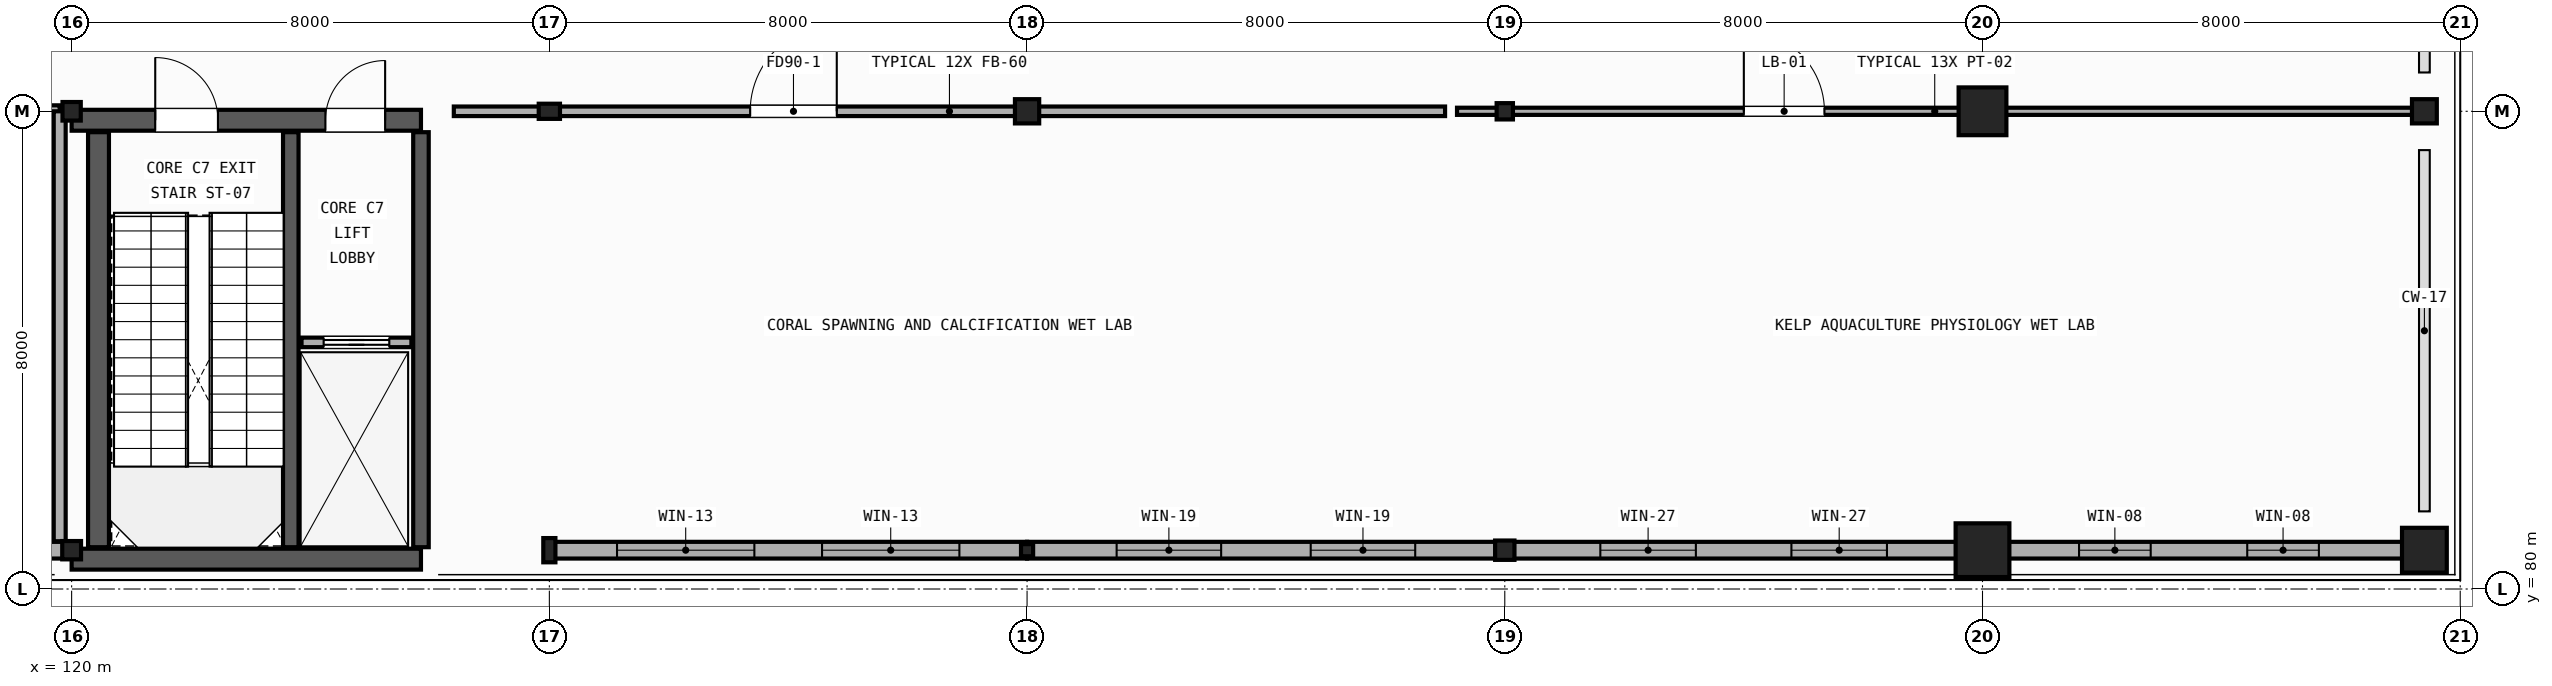
"""IFC4 building model, lengths in metres.
Left out: names, types, materials, properties, quantities, classifications, styles, units other than length and angle.
Written with IfcOpenShell. Run it as: python <this file> out.ifc"""

import sys

from ifc_helpers import new_model, si_unit, direction, frame, frame_2d, origin, origin_2d, place, context, subcontext, project, spatial, rectangle, hollow_rectangle, circle, hollow_circle, i_section, extrude, element, fill, save


model = new_model("IFC4")
c1 = context("Model", 3, precision=1e-05, world=origin(), true_north=direction((0.0, 1.0)))
c2 = subcontext(c1, "Body", "Model", "MODEL_VIEW")
j1 = project(units=[si_unit("LENGTHUNIT", "METRE"), si_unit("PLANEANGLEUNIT", "RADIAN")], contexts=[c1])
p1 = place(None, origin())
s1 = spatial("IfcSite", under=j1, at=p1, CompositionType="ELEMENT")
p2 = place(p1, origin())
s2 = spatial("IfcBuilding", under=s1, at=p2, CompositionType="ELEMENT")
p3 = place(p2, frame((0.0, 0.0, 5.4)))
s3 = spatial("IfcBuildingStorey", under=s2, at=p3, CompositionType="ELEMENT", Elevation=5.4)
p4 = place(p3, frame((120.0, 80.65, 0.0), z_axis=(0.0, 0.0, 1.0), x_axis=(0.0, 1.0, 0.0)))
e1 = element("IfcColumn", 1, at=p4, inside=s3, PredefinedType="COLUMN", context=c2, shape_type="SweptSolid", body=[
    extrude(i_section(OverallWidth=0.307, OverallDepth=0.315, WebThickness=0.012, FlangeThickness=0.019, FilletRadius=0.013, at=origin_2d()), origin(), (0.0, 0.0, 1.0), 4.52),
])
p5 = place(p3, frame((120.0, 88.0, 0.0), z_axis=(0.0, 0.0, 1.0), x_axis=(1.0, 0.0, 0.0)))
e2 = element("IfcColumn", 2, at=p5, inside=s3, PredefinedType="COLUMN", context=c2, shape_type="SweptSolid", body=[
    extrude(i_section(OverallWidth=0.306, OverallDepth=0.311, WebThickness=0.011, FlangeThickness=0.017, FilletRadius=0.013, at=origin_2d()), origin(), (0.0, 0.0, 1.0), 4.52),
])
p6 = place(p3, frame((128.0, 80.65, 0.0), z_axis=(0.0, 0.0, 1.0), x_axis=(1.0, 0.0, 0.0)))
e3 = element("IfcColumn", 3, at=p6, inside=s3, PredefinedType="COLUMN", context=c2, shape_type="SweptSolid", body=[
    extrude(hollow_rectangle(XDim=0.203, YDim=0.406, WallThickness=0.012, InnerFilletRadius=0.012, OuterFilletRadius=0.024, at=origin_2d()), origin(), (0.0, 0.0, 1.0), 4.52),
])
p7 = place(p3, frame((128.0, 88.0, 0.0), z_axis=(0.0, 0.0, 1.0), x_axis=(0.0, 1.0, 0.0)))
e4 = element("IfcColumn", 4, at=p7, inside=s3, PredefinedType="COLUMN", context=c2, shape_type="SweptSolid", body=[
    extrude(hollow_rectangle(XDim=0.254, YDim=0.356, WallThickness=0.012, InnerFilletRadius=0.012, OuterFilletRadius=0.024, at=origin_2d()), origin(), (0.0, 0.0, 1.0), 4.52),
])
p8 = place(p3, frame((136.0, 80.65, 0.0), z_axis=(0.0, 0.0, 1.0), x_axis=(0.0, 1.0, 0.0)))
e5 = element("IfcColumn", 5, at=p8, inside=s3, PredefinedType="COLUMN", context=c2, shape_type="SweptSolid", body=[
    extrude(hollow_rectangle(XDim=0.203, YDim=0.203, WallThickness=0.009, InnerFilletRadius=0.009, OuterFilletRadius=0.018, at=origin_2d()), origin(), (0.0, 0.0, 1.0), 4.52),
])
p9 = place(p3, frame((136.0, 88.0, 0.0), z_axis=(0.0, 0.0, 1.0), x_axis=(1.0, 0.0, 0.0)))
e6 = element("IfcColumn", 6, at=p9, inside=s3, PredefinedType="COLUMN", context=c2, shape_type="SweptSolid", body=[
    extrude(hollow_circle(Radius=0.203, WallThickness=0.012, at=origin_2d()), origin(), (0.0, 0.0, 1.0), 4.52),
])
p10 = place(p3, frame((144.0, 80.65, 0.0), z_axis=(0.0, 0.0, 1.0), x_axis=(1.0, 0.0, 0.0)))
e7 = element("IfcColumn", 7, at=p10, inside=s3, PredefinedType="COLUMN", context=c2, shape_type="SweptSolid", body=[
    extrude(hollow_circle(Radius=0.162, WallThickness=0.012, at=origin_2d()), origin(), (0.0, 0.0, 1.0), 4.52),
])
p11 = place(p3, frame((144.0, 88.0, 0.0), z_axis=(0.0, 0.0, 1.0), x_axis=(0.0, 1.0, 0.0)))
e8 = element("IfcColumn", 8, at=p11, inside=s3, PredefinedType="COLUMN", context=c2, shape_type="SweptSolid", body=[
    extrude(hollow_circle(Radius=0.136, WallThickness=0.012, at=origin_2d()), origin(), (0.0, 0.0, 1.0), 4.52),
])
p12 = place(p3, frame((152.0, 80.65, 0.0), z_axis=(0.0, 0.0, 1.0), x_axis=(0.0, 1.0, 0.0)))
e9 = element("IfcColumn", 9, at=p12, inside=s3, PredefinedType="COLUMN", context=c2, shape_type="SweptSolid", body=[
    extrude(rectangle(XDim=0.9, YDim=0.9, at=origin_2d()), origin(), (0.0, 0.0, 1.0), 4.52),
])
p13 = place(p3, frame((152.0, 88.0, 0.0), z_axis=(0.0, 0.0, 1.0), x_axis=(1.0, 0.0, 0.0)))
e10 = element("IfcColumn", 10, at=p13, inside=s3, PredefinedType="COLUMN", context=c2, shape_type="SweptSolid", body=[
    extrude(rectangle(XDim=0.8, YDim=0.8, at=origin_2d()), origin(), (0.0, 0.0, 1.0), 4.52),
])
p14 = place(p3, frame((159.4, 80.65, 0.0), z_axis=(0.0, 0.0, 1.0), x_axis=(1.0, 0.0, 0.0)))
e11 = element("IfcColumn", 11, at=p14, inside=s3, PredefinedType="COLUMN", context=c2, shape_type="SweptSolid", body=[
    extrude(circle(Radius=0.375, at=origin_2d()), origin(), (0.0, 0.0, 1.0), 4.52),
])
p15 = place(p3, frame((159.4, 88.0, 0.0), z_axis=(0.0, 0.0, 1.0), x_axis=(0.0, 1.0, 0.0)))
e12 = element("IfcColumn", 12, at=p15, inside=s3, PredefinedType="COLUMN", context=c2, shape_type="SweptSolid", body=[
    extrude(i_section(OverallWidth=0.406, OverallDepth=0.416, WebThickness=0.03, FlangeThickness=0.048, FilletRadius=0.015, at=origin_2d()), origin(), (0.0, 0.0, 1.0), 4.52),
])
p16 = place(p3, frame((112.65, 80.65, 0.0), z_axis=(0.0, 0.0, 1.0), x_axis=(1.0, 0.0, 0.0)))
e13 = element("IfcWall", 13, at=p16, inside=s3, PredefinedType="STANDARD", context=c2, shape_type="SweptSolid", body=[
    extrude(rectangle(XDim=7.35, YDim=0.28, at=frame_2d((3.675, 0.0))), origin(), (0.0, 0.0, 1.0), 3.872),
])
p17 = place(p16, frame((1.383, 0.0, 0.95)))
e14 = element("IfcOpeningElement", 14, at=p17, cuts=e13, PredefinedType="OPENING", context=c2, shape_type="SweptSolid", body=[
    extrude(rectangle(XDim=1.6, YDim=2.3, at=frame_2d((0.8, 1.15))), frame((0.0, 0.15, 0.0), z_axis=(0.0, -1.0, 0.0), x_axis=(1.0, 0.0, 0.0)), (0.0, 0.0, 1.0), 0.3),
])
p18 = place(p16, frame((4.367, 0.0, 0.95)))
e15 = element("IfcOpeningElement", 15, at=p18, cuts=e13, PredefinedType="OPENING", context=c2, shape_type="SweptSolid", body=[
    extrude(rectangle(XDim=1.6, YDim=2.3, at=frame_2d((0.8, 1.15))), frame((0.0, 0.15, 0.0), z_axis=(0.0, -1.0, 0.0), x_axis=(1.0, 0.0, 0.0)), (0.0, 0.0, 1.0), 0.3),
])
p19 = place(p3, frame((128.0, 80.65, 0.0), z_axis=(0.0, 0.0, 1.0), x_axis=(1.0, 0.0, 0.0)))
e16 = element("IfcWall", 16, at=p19, inside=s3, PredefinedType="STANDARD", context=c2, shape_type="SweptSolid", body=[
    extrude(rectangle(XDim=8.0, YDim=0.28, at=frame_2d((4.0, 0.0))), origin(), (0.0, 0.0, 1.0), 3.68),
])
p20 = place(p19, frame((1.133, 0.0, 2.25)))
e17 = element("IfcOpeningElement", 17, at=p20, cuts=e16, PredefinedType="OPENING", context=c2, shape_type="SweptSolid", body=[
    extrude(rectangle(XDim=2.3, YDim=1.2, at=frame_2d((1.15, 0.6))), frame((0.0, 0.15, 0.0), z_axis=(0.0, -1.0, 0.0), x_axis=(1.0, 0.0, 0.0)), (0.0, 0.0, 1.0), 0.3),
])
p21 = place(p19, frame((4.567, 0.0, 2.25)))
e18 = element("IfcOpeningElement", 18, at=p21, cuts=e16, PredefinedType="OPENING", context=c2, shape_type="SweptSolid", body=[
    extrude(rectangle(XDim=2.3, YDim=1.2, at=frame_2d((1.15, 0.6))), frame((0.0, 0.15, 0.0), z_axis=(0.0, -1.0, 0.0), x_axis=(1.0, 0.0, 0.0)), (0.0, 0.0, 1.0), 0.3),
])
p22 = place(p3, frame((136.0, 80.65, 0.0), z_axis=(0.0, 0.0, 1.0), x_axis=(1.0, 0.0, 0.0)))
e19 = element("IfcWall", 19, at=p22, inside=s3, PredefinedType="STANDARD", context=c2, shape_type="SweptSolid", body=[
    extrude(rectangle(XDim=8.0, YDim=0.28, at=frame_2d((4.0, 0.0))), origin(), (0.0, 0.0, 1.0), 3.68),
])
p23 = place(p22, frame((1.5, 0.0, 0.9)))
e20 = element("IfcOpeningElement", 20, at=p23, cuts=e19, PredefinedType="OPENING", context=c2, shape_type="SweptSolid", body=[
    extrude(rectangle(XDim=1.75, YDim=2.4, at=frame_2d((0.875, 1.2))), frame((0.0, 0.15, 0.0), z_axis=(0.0, -1.0, 0.0), x_axis=(1.0, 0.0, 0.0)), (0.0, 0.0, 1.0), 0.3),
])
p24 = place(p22, frame((4.75, 0.0, 0.9)))
e21 = element("IfcOpeningElement", 21, at=p24, cuts=e19, PredefinedType="OPENING", context=c2, shape_type="SweptSolid", body=[
    extrude(rectangle(XDim=1.75, YDim=2.4, at=frame_2d((0.875, 1.2))), frame((0.0, 0.15, 0.0), z_axis=(0.0, -1.0, 0.0), x_axis=(1.0, 0.0, 0.0)), (0.0, 0.0, 1.0), 0.3),
])
p25 = place(p3, frame((144.0, 80.65, 0.0), z_axis=(0.0, 0.0, 1.0), x_axis=(1.0, 0.0, 0.0)))
e22 = element("IfcWall", 22, at=p25, inside=s3, PredefinedType="STANDARD", context=c2, shape_type="SweptSolid", body=[
    extrude(rectangle(XDim=8.0, YDim=0.28, at=frame_2d((4.0, 0.0))), origin(), (0.0, 0.0, 1.0), 3.68),
])
p26 = place(p25, frame((1.6, 0.0, 1.05)))
e23 = element("IfcOpeningElement", 23, at=p26, cuts=e22, PredefinedType="OPENING", context=c2, shape_type="SweptSolid", body=[
    extrude(rectangle(XDim=1.6, YDim=1.75, at=frame_2d((0.8, 0.875))), frame((0.0, 0.15, 0.0), z_axis=(0.0, -1.0, 0.0), x_axis=(1.0, 0.0, 0.0)), (0.0, 0.0, 1.0), 0.3),
])
p27 = place(p25, frame((4.8, 0.0, 1.05)))
e24 = element("IfcOpeningElement", 24, at=p27, cuts=e22, PredefinedType="OPENING", context=c2, shape_type="SweptSolid", body=[
    extrude(rectangle(XDim=1.6, YDim=1.75, at=frame_2d((0.8, 0.875))), frame((0.0, 0.15, 0.0), z_axis=(0.0, -1.0, 0.0), x_axis=(1.0, 0.0, 0.0)), (0.0, 0.0, 1.0), 0.3),
])
p28 = place(p3, frame((152.0, 80.65, 0.0), z_axis=(0.0, 0.0, 1.0), x_axis=(1.0, 0.0, 0.0)))
e25 = element("IfcWall", 25, at=p28, inside=s3, PredefinedType="STANDARD", context=c2, shape_type="SweptSolid", body=[
    extrude(rectangle(XDim=7.25, YDim=0.28, at=frame_2d((3.625, 0.0))), origin(), (0.0, 0.0, 1.0), 3.727),
])
p29 = place(p28, frame((1.617, 0.0, 1.0)))
e26 = element("IfcOpeningElement", 26, at=p29, cuts=e25, PredefinedType="OPENING", context=c2, shape_type="SweptSolid", body=[
    extrude(rectangle(XDim=1.2, YDim=1.9, at=frame_2d((0.6, 0.95))), frame((0.0, 0.15, 0.0), z_axis=(0.0, -1.0, 0.0), x_axis=(1.0, 0.0, 0.0)), (0.0, 0.0, 1.0), 0.3),
])
p30 = place(p28, frame((4.433, 0.0, 1.0)))
e27 = element("IfcOpeningElement", 27, at=p30, cuts=e25, PredefinedType="OPENING", context=c2, shape_type="SweptSolid", body=[
    extrude(rectangle(XDim=1.2, YDim=1.9, at=frame_2d((0.6, 0.95))), frame((0.0, 0.15, 0.0), z_axis=(0.0, -1.0, 0.0), x_axis=(1.0, 0.0, 0.0)), (0.0, 0.0, 1.0), 0.3),
])
p31 = place(p3, frame((120.0, 87.85, 0.0), z_axis=(0.0, 0.0, 1.0), x_axis=(1.0, 0.0, 0.0)))
e28 = element("IfcWall", 28, at=p31, inside=s3, PredefinedType="SHEAR", context=c2, shape_type="SweptSolid", body=[
    extrude(rectangle(XDim=5.85, YDim=0.35, at=frame_2d((2.925, 0.0))), origin(), (0.0, 0.0, 1.0), 4.51),
])
p32 = place(p31, frame((1.4, 0.0, 0.0)))
e29 = element("IfcOpeningElement", 29, at=p32, cuts=e28, PredefinedType="OPENING", context=c2, shape_type="SweptSolid", body=[
    extrude(rectangle(XDim=1.05, YDim=2.1, at=frame_2d((0.525, 1.05))), frame((0.0, 0.185, 0.0), z_axis=(0.0, -1.0, 0.0), x_axis=(1.0, 0.0, 0.0)), (0.0, 0.0, 1.0), 0.37),
])
p33 = place(p31, frame((4.25, 0.0, 0.0)))
e30 = element("IfcOpeningElement", 30, at=p33, cuts=e28, PredefinedType="OPENING", context=c2, shape_type="SweptSolid", body=[
    extrude(rectangle(XDim=1.0, YDim=2.15, at=frame_2d((0.5, 1.075))), frame((0.0, 0.185, 0.0), z_axis=(0.0, -1.0, 0.0), x_axis=(1.0, 0.0, 0.0)), (0.0, 0.0, 1.0), 0.37),
])
p34 = place(p3, frame((120.0, 80.5, 0.0), z_axis=(0.0, 0.0, 1.0), x_axis=(1.0, 0.0, 0.0)))
e31 = element("IfcWall", 31, at=p34, inside=s3, PredefinedType="SHEAR", context=c2, shape_type="SweptSolid", body=[
    extrude(rectangle(XDim=5.85, YDim=0.35, at=frame_2d((2.925, 0.0))), origin(), (0.0, 0.0, 1.0), 4.51),
])
p35 = place(p3, frame((120.45, 80.7, 0.0), z_axis=(0.0, 0.0, 1.0), x_axis=(0.0, 1.0, 0.0)))
e32 = element("IfcWall", 32, at=p35, inside=s3, PredefinedType="SHEAR", context=c2, shape_type="SweptSolid", body=[
    extrude(rectangle(XDim=6.95, YDim=0.35, at=frame_2d((3.475, 0.0))), origin(), (0.0, 0.0, 1.0), 4.51),
])
for number, where, z_axis, x_axis in (
    (33, (125.85, 80.7, 0.0), (0.0, 0.0, 1.0), (0.0, 1.0, 0.0)),
    (34, (123.67, 80.7, 0.0), (0.0, 0.0, 1.0), (0.0, 1.0, 0.0)),
):
    element("IfcWall", number, at=place(p3, frame(where, z_axis=z_axis, x_axis=x_axis)), inside=s3, PredefinedType="SHEAR", context=c2, shape_type="SweptSolid", body=[
        extrude(rectangle(XDim=6.95, YDim=0.26, at=frame_2d((3.475, 0.0))), origin(), (0.0, 0.0, 1.0), 4.51),
    ])
p36 = place(p3, frame((123.85, 84.13, 0.0), z_axis=(0.0, 0.0, 1.0), x_axis=(1.0, 0.0, 0.0)))
e35 = element("IfcWall", 35, at=p36, inside=s3, PredefinedType="PARTITIONING", context=c2, shape_type="SweptSolid", body=[
    extrude(rectangle(XDim=1.84, YDim=0.16, at=frame_2d((0.92, 0.0))), origin(), (0.0, 0.0, 1.0), 3.6),
])
p37 = place(p36, frame((0.37, 0.0, 0.0)))
e36 = element("IfcOpeningElement", 36, at=p37, cuts=e35, PredefinedType="OPENING", context=c2, shape_type="SweptSolid", body=[
    extrude(rectangle(XDim=1.1, YDim=2.15, at=frame_2d((0.55, 1.075))), frame((0.0, 0.09, 0.0), z_axis=(0.0, -1.0, 0.0), x_axis=(1.0, 0.0, 0.0)), (0.0, 0.0, 1.0), 0.18),
])
p38 = place(p3, frame((113.0, 88.0, 0.0), z_axis=(0.0, 0.0, 1.0), x_axis=(1.0, 0.0, 0.0)))
e37 = element("IfcWall", 37, at=p38, inside=s3, PredefinedType="PLUMBINGWALL", context=c2, shape_type="SweptSolid", body=[
    extrude(rectangle(XDim=6.8, YDim=0.2, at=frame_2d((3.4, 0.0))), origin(), (0.0, 0.0, 1.0), 3.802),
])
p39 = place(p38, frame((2.945, 0.0, 0.0)))
e38 = element("IfcOpeningElement", 38, at=p39, cuts=e37, PredefinedType="OPENING", context=c2, shape_type="SweptSolid", body=[
    extrude(rectangle(XDim=0.91, YDim=2.1, at=frame_2d((0.455, 1.05))), frame((0.0, 0.11, 0.0), z_axis=(0.0, -1.0, 0.0), x_axis=(1.0, 0.0, 0.0)), (0.0, 0.0, 1.0), 0.22),
])
p40 = place(p3, frame((119.8, 80.8, 0.0), z_axis=(0.0, 0.0, 1.0), x_axis=(0.0, 1.0, 0.0)))
e39 = element("IfcWall", 39, at=p40, inside=s3, PredefinedType="PLUMBINGWALL", context=c2, shape_type="SweptSolid", body=[
    extrude(rectangle(XDim=7.2, YDim=0.2, at=frame_2d((3.6, 0.0))), origin(), (0.0, 0.0, 1.0), 3.872),
])
p41 = place(p3, frame((126.4, 88.0, 0.0), z_axis=(0.0, 0.0, 1.0), x_axis=(1.0, 0.0, 0.0)))
e40 = element("IfcWall", 40, at=p41, inside=s3, PredefinedType="PARTITIONING", context=c2, shape_type="SweptSolid", body=[
    extrude(rectangle(XDim=16.6, YDim=0.16, at=frame_2d((8.3, 0.0))), origin(), (0.0, 0.0, 1.0), 3.718),
])
p42 = place(p41, frame((4.963, 0.0, 0.0)))
e41 = element("IfcOpeningElement", 41, at=p42, cuts=e40, PredefinedType="OPENING", context=c2, shape_type="SweptSolid", body=[
    extrude(rectangle(XDim=1.45, YDim=2.25, at=frame_2d((0.725, 1.125))), frame((0.0, 0.09, 0.0), z_axis=(0.0, -1.0, 0.0), x_axis=(1.0, 0.0, 0.0)), (0.0, 0.0, 1.0), 0.18),
])
p43 = place(p3, frame((143.2, 88.0, 0.0), z_axis=(0.0, 0.0, 1.0), x_axis=(1.0, 0.0, 0.0)))
e42 = element("IfcWall", 42, at=p43, inside=s3, PredefinedType="PARTITIONING", context=c2, shape_type="SweptSolid", body=[
    extrude(rectangle(XDim=16.0, YDim=0.12, at=frame_2d((8.0, 0.0))), origin(), (0.0, 0.0, 1.0), 3.718),
])
p44 = place(p43, frame((4.803, 0.0, 0.0)))
e43 = element("IfcOpeningElement", 43, at=p44, cuts=e42, PredefinedType="OPENING", context=c2, shape_type="SweptSolid", body=[
    extrude(rectangle(XDim=1.35, YDim=2.25, at=frame_2d((0.675, 1.125))), frame((0.0, 0.07, 0.0), z_axis=(0.0, -1.0, 0.0), x_axis=(1.0, 0.0, 0.0)), (0.0, 0.0, 1.0), 0.14),
])
p45 = place(p20, origin())
e44 = element("IfcWindow", 44, at=p45, inside=s3, PartitioningType="SINGLE_PANEL", PredefinedType="WINDOW", context=c2, shape_type="SweptSolid", body=[
    extrude(rectangle(XDim=2.3, YDim=1.2, at=frame_2d((1.15, 0.6))), frame((0.0, 0.03, 0.0), z_axis=(0.0, -1.0, 0.0), x_axis=(1.0, 0.0, 0.0)), (0.0, 0.0, 1.0), 0.06),
])
fill(e17, e44)
p46 = place(p21, origin())
e45 = element("IfcWindow", 45, at=p46, inside=s3, PartitioningType="SINGLE_PANEL", PredefinedType="WINDOW", context=c2, shape_type="SweptSolid", body=[
    extrude(rectangle(XDim=2.3, YDim=1.2, at=frame_2d((1.15, 0.6))), frame((0.0, 0.03, 0.0), z_axis=(0.0, -1.0, 0.0), x_axis=(1.0, 0.0, 0.0)), (0.0, 0.0, 1.0), 0.06),
])
fill(e18, e45)
p47 = place(p23, origin())
e46 = element("IfcWindow", 46, at=p47, inside=s3, PartitioningType="SINGLE_PANEL", PredefinedType="WINDOW", context=c2, shape_type="SweptSolid", body=[
    extrude(rectangle(XDim=1.75, YDim=2.4, at=frame_2d((0.875, 1.2))), frame((0.0, 0.03, 0.0), z_axis=(0.0, -1.0, 0.0), x_axis=(1.0, 0.0, 0.0)), (0.0, 0.0, 1.0), 0.06),
])
fill(e20, e46)
p48 = place(p24, origin())
e47 = element("IfcWindow", 47, at=p48, inside=s3, PartitioningType="SINGLE_PANEL", PredefinedType="WINDOW", context=c2, shape_type="SweptSolid", body=[
    extrude(rectangle(XDim=1.75, YDim=2.4, at=frame_2d((0.875, 1.2))), frame((0.0, 0.03, 0.0), z_axis=(0.0, -1.0, 0.0), x_axis=(1.0, 0.0, 0.0)), (0.0, 0.0, 1.0), 0.06),
])
fill(e21, e47)
p49 = place(p26, origin())
e48 = element("IfcWindow", 48, at=p49, inside=s3, PartitioningType="SINGLE_PANEL", PredefinedType="WINDOW", context=c2, shape_type="SweptSolid", body=[
    extrude(rectangle(XDim=1.6, YDim=1.75, at=frame_2d((0.8, 0.875))), frame((0.0, 0.03, 0.0), z_axis=(0.0, -1.0, 0.0), x_axis=(1.0, 0.0, 0.0)), (0.0, 0.0, 1.0), 0.06),
])
fill(e23, e48)
p50 = place(p27, origin())
e49 = element("IfcWindow", 49, at=p50, inside=s3, PartitioningType="SINGLE_PANEL", PredefinedType="WINDOW", context=c2, shape_type="SweptSolid", body=[
    extrude(rectangle(XDim=1.6, YDim=1.75, at=frame_2d((0.8, 0.875))), frame((0.0, 0.03, 0.0), z_axis=(0.0, -1.0, 0.0), x_axis=(1.0, 0.0, 0.0)), (0.0, 0.0, 1.0), 0.06),
])
fill(e24, e49)
p51 = place(p29, origin())
e50 = element("IfcWindow", 50, at=p51, inside=s3, PartitioningType="SINGLE_PANEL", PredefinedType="WINDOW", context=c2, shape_type="SweptSolid", body=[
    extrude(rectangle(XDim=1.2, YDim=1.9, at=frame_2d((0.6, 0.95))), frame((0.0, 0.03, 0.0), z_axis=(0.0, -1.0, 0.0), x_axis=(1.0, 0.0, 0.0)), (0.0, 0.0, 1.0), 0.06),
])
fill(e26, e50)
p52 = place(p30, origin())
e51 = element("IfcWindow", 51, at=p52, inside=s3, PartitioningType="SINGLE_PANEL", PredefinedType="WINDOW", context=c2, shape_type="SweptSolid", body=[
    extrude(rectangle(XDim=1.2, YDim=1.9, at=frame_2d((0.6, 0.95))), frame((0.0, 0.03, 0.0), z_axis=(0.0, -1.0, 0.0), x_axis=(1.0, 0.0, 0.0)), (0.0, 0.0, 1.0), 0.06),
])
fill(e27, e51)
p53 = place(p37, origin())
e52 = element("IfcDoor", 52, at=p53, inside=s3, OperationType="SLIDING_TO_LEFT", PredefinedType="DOOR", context=c2, shape_type="SweptSolid", body=[
    extrude(rectangle(XDim=1.1, YDim=2.15, at=frame_2d((0.55, 1.075))), frame((0.0, 0.025, 0.0), z_axis=(0.0, -1.0, 0.0), x_axis=(1.0, 0.0, 0.0)), (0.0, 0.0, 1.0), 0.05),
])
fill(e36, e52)
p54 = place(p32, origin())
e53 = element("IfcDoor", 53, at=p54, inside=s3, OperationType="SINGLE_SWING_LEFT", PredefinedType="DOOR", context=c2, shape_type="SweptSolid", body=[
    extrude(rectangle(XDim=1.05, YDim=2.1, at=frame_2d((0.525, 1.05))), frame((0.0, 0.025, 0.0), z_axis=(0.0, -1.0, 0.0), x_axis=(1.0, 0.0, 0.0)), (0.0, 0.0, 1.0), 0.05),
])
fill(e29, e53)
p55 = place(p33, origin())
e54 = element("IfcDoor", 54, at=p55, inside=s3, OperationType="SINGLE_SWING_RIGHT", PredefinedType="DOOR", context=c2, shape_type="SweptSolid", body=[
    extrude(rectangle(XDim=1.0, YDim=2.15, at=frame_2d((0.5, 1.075))), frame((0.0, 0.025, 0.0), z_axis=(0.0, -1.0, 0.0), x_axis=(1.0, 0.0, 0.0)), (0.0, 0.0, 1.0), 0.05),
])
fill(e30, e54)
p56 = place(p42, origin())
e55 = element("IfcDoor", 55, at=p56, inside=s3, OperationType="SINGLE_SWING_RIGHT", PredefinedType="DOOR", context=c2, shape_type="SweptSolid", body=[
    extrude(rectangle(XDim=1.45, YDim=2.25, at=frame_2d((0.725, 1.125))), frame((0.0, 0.025, 0.0), z_axis=(0.0, -1.0, 0.0), x_axis=(1.0, 0.0, 0.0)), (0.0, 0.0, 1.0), 0.05),
])
fill(e41, e55)
p57 = place(p44, origin())
e56 = element("IfcDoor", 56, at=p57, inside=s3, OperationType="SINGLE_SWING_LEFT", PredefinedType="DOOR", context=c2, shape_type="SweptSolid", body=[
    extrude(rectangle(XDim=1.35, YDim=2.25, at=frame_2d((0.675, 1.125))), frame((0.0, 0.025, 0.0), z_axis=(0.0, -1.0, 0.0), x_axis=(1.0, 0.0, 0.0)), (0.0, 0.0, 1.0), 0.05),
])
fill(e43, e56)
save(model, sys.argv[1])
